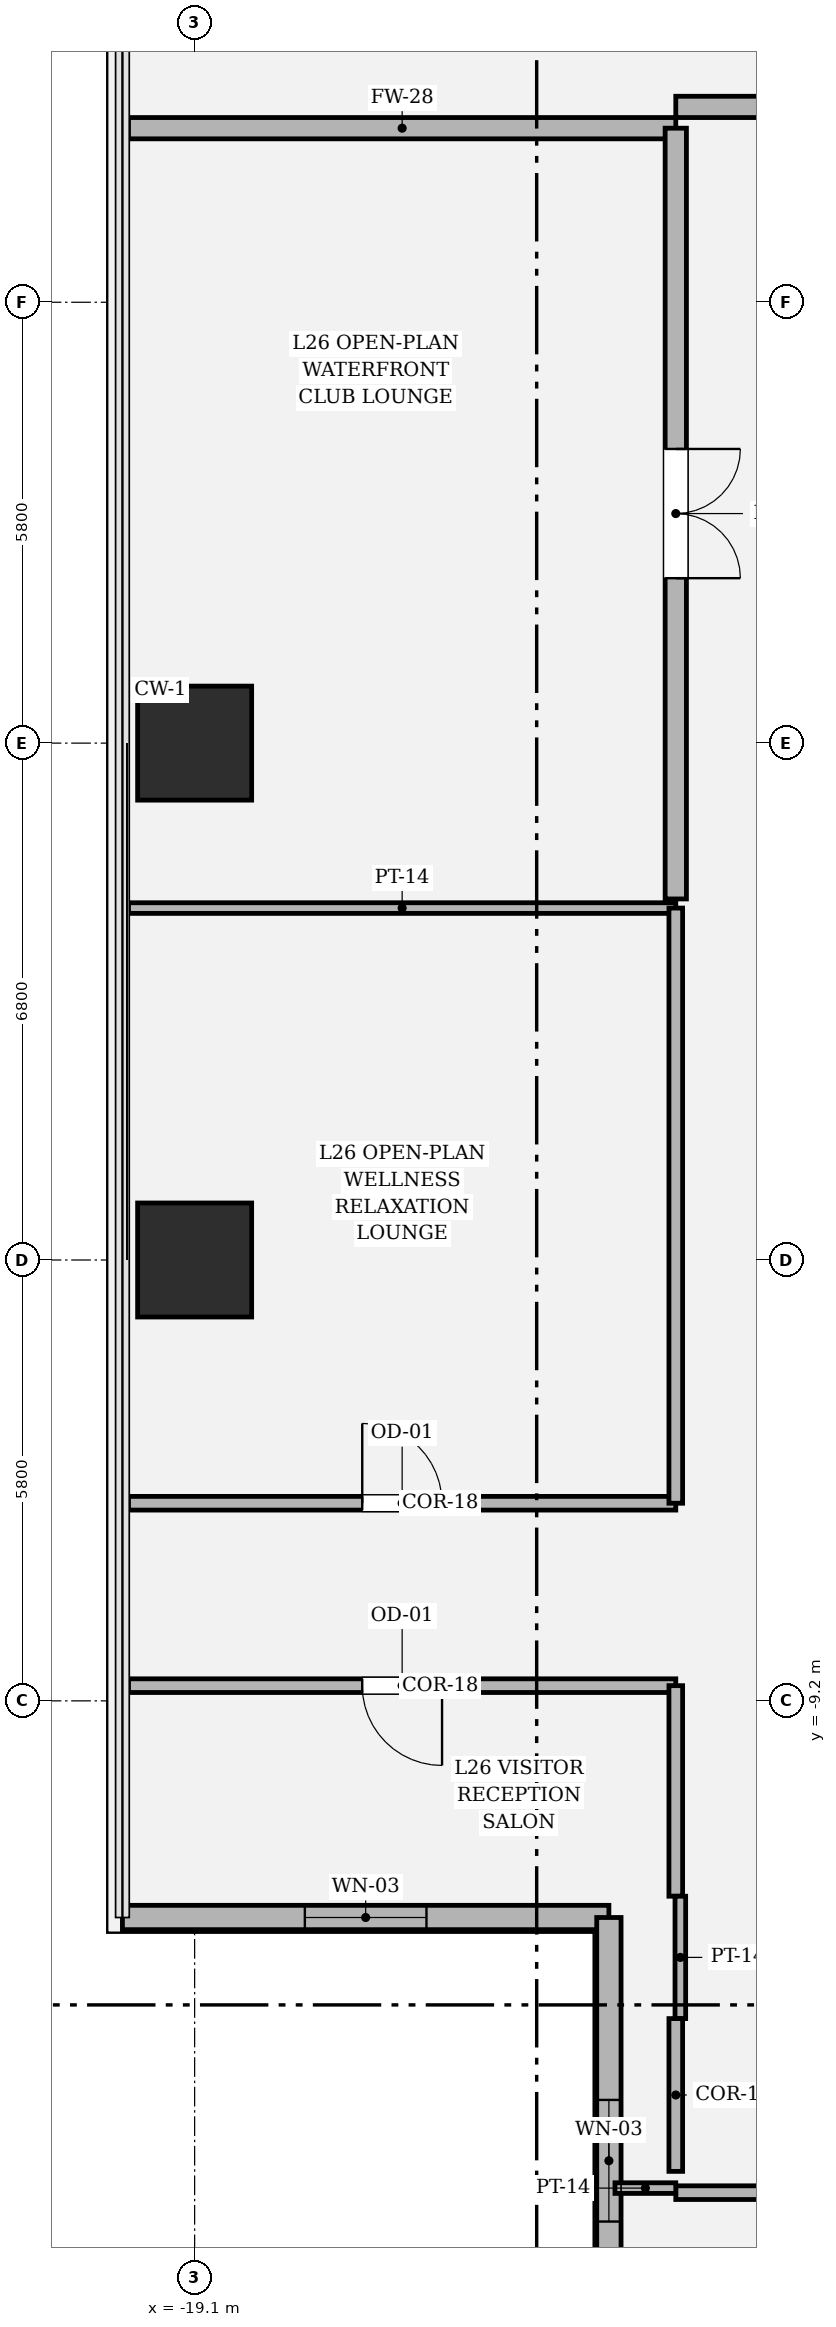
"""IFC4 building model, lengths in metres.
Left out: names, types, materials, properties, quantities, classifications, styles, units other than length and angle.
Written with IfcOpenShell. Run it as: python <this file> out.ifc"""

import sys

from ifc_helpers import new_model, si_unit, direction, frame, frame_2d, origin, origin_2d, place, context, subcontext, project, spatial, rectangle, hollow_rectangle, extrude, element, fill, save


model = new_model("IFC4")
c1 = context("Model", 3, precision=1e-05, world=origin(), true_north=direction((0.0, 1.0)))
c2 = subcontext(c1, "Body", "Model", "MODEL_VIEW")
j1 = project(units=[si_unit("LENGTHUNIT", "METRE"), si_unit("PLANEANGLEUNIT", "RADIAN")], contexts=[c1])
p1 = place(None, origin())
s1 = spatial("IfcSite", under=j1, at=p1, CompositionType="ELEMENT")
p2 = place(p1, origin())
s2 = spatial("IfcBuilding", under=s1, at=p2, CompositionType="ELEMENT")
p3 = place(p2, frame((0.0, 0.0, 113.25)))
s3 = spatial("IfcBuildingStorey", under=s2, at=p3, CompositionType="ELEMENT", Elevation=113.25)
for number, where, z_axis, x_axis in (
    (1, (-19.1, 3.4, 0.0), (0.0, 0.0, 1.0), (1.0, 0.0, 0.0)),
    (2, (-19.1, -3.4, 0.0), (0.0, 0.0, 1.0), (1.0, 0.0, 0.0)),
):
    element("IfcColumn", number, at=place(p3, frame(where, z_axis=z_axis, x_axis=x_axis)), inside=s3, PredefinedType="COLUMN", context=c2, shape_type="SweptSolid", body=[
        extrude(hollow_rectangle(XDim=1.5, YDim=1.5, WallThickness=0.045, at=origin_2d()), origin(), (0.0, 0.0, 1.0), 4.05),
    ])
p4 = place(p3, frame((-20.05, -12.05, 0.0), z_axis=(0.0, 0.0, 1.0), x_axis=(1.0, 0.0, 0.0)))
e3 = element("IfcWall", 3, at=p4, inside=s3, PredefinedType="SOLIDWALL", context=c2, shape_type="SweptSolid", body=[
    extrude(rectangle(XDim=6.4, YDim=0.32, at=frame_2d((3.2, 0.0))), origin(), (0.0, 0.0, 1.0), 3.104),
])
p5 = place(p4, frame((2.4, 0.0, 0.464)))
e4 = element("IfcOpeningElement", 4, at=p5, cuts=e3, PredefinedType="OPENING", context=c2, shape_type="SweptSolid", body=[
    extrude(rectangle(XDim=1.6, YDim=2.4, at=frame_2d((0.8, 1.2))), frame((0.0, 0.17, 0.0), z_axis=(0.0, -1.0, 0.0), x_axis=(1.0, 0.0, 0.0)), (0.0, 0.0, 1.0), 0.34),
])
p6 = place(p3, frame((-13.65, -12.05, 0.0), z_axis=(0.0, 0.0, 1.0), x_axis=(0.0, -1.0, 0.0)))
e5 = element("IfcWall", 5, at=p6, inside=s3, PredefinedType="SOLIDWALL", context=c2, shape_type="SweptSolid", body=[
    extrude(rectangle(XDim=6.4, YDim=0.32, at=frame_2d((3.2, 0.0))), origin(), (0.0, 0.0, 1.0), 3.104),
])
p7 = place(p6, frame((2.4, 0.0, 0.464)))
e6 = element("IfcOpeningElement", 6, at=p7, cuts=e5, PredefinedType="OPENING", context=c2, shape_type="SweptSolid", body=[
    extrude(rectangle(XDim=1.6, YDim=2.4, at=frame_2d((0.8, 1.2))), frame((0.0, 0.17, 0.0), z_axis=(0.0, -1.0, 0.0), x_axis=(1.0, 0.0, 0.0)), (0.0, 0.0, 1.0), 0.34),
])
p8 = place(p3, frame((-12.77, -15.67, 0.0), z_axis=(0.0, 0.0, 1.0), x_axis=(1.0, 0.0, 0.0)))
e7 = element("IfcWall", 7, at=p8, inside=s3, PredefinedType="PARTITIONING", context=c2, shape_type="SweptSolid", body=[
    extrude(rectangle(XDim=15.11, YDim=0.18, at=frame_2d((7.555, 0.0))), origin(), (0.0, 0.0, 1.0), 3.104),
])
p9 = place(p8, frame((7.03, 0.0, 0.0)))
e8 = element("IfcOpeningElement", 8, at=p9, cuts=e7, PredefinedType="OPENING", context=c2, shape_type="SweptSolid", body=[
    extrude(rectangle(XDim=1.05, YDim=2.2, at=frame_2d((0.525, 1.1))), frame((0.0, 0.1, 0.0), z_axis=(0.0, -1.0, 0.0), x_axis=(1.0, 0.0, 0.0)), (0.0, 0.0, 1.0), 0.2),
])
p10 = place(p3, frame((-13.57, -15.61, 0.0), z_axis=(0.0, 0.0, 1.0), x_axis=(1.0, 0.0, 0.0)))
e9 = element("IfcWall", 9, at=p10, inside=s3, PredefinedType="PARTITIONING", context=c2, shape_type="SweptSolid", body=[
    extrude(rectangle(XDim=0.8, YDim=0.14, at=frame_2d((0.4, 0.0))), origin(), (0.0, 0.0, 1.0), 3.81),
])
p11 = place(p3, frame((-19.97, -9.0, 0.0), z_axis=(0.0, 0.0, 1.0), x_axis=(1.0, 0.0, 0.0)))
e10 = element("IfcWall", 10, at=p11, inside=s3, PredefinedType="PARTITIONING", context=c2, shape_type="SweptSolid", body=[
    extrude(rectangle(XDim=7.2, YDim=0.18, at=frame_2d((3.6, 0.0))), origin(), (0.0, 0.0, 1.0), 3.104),
])
p12 = place(p11, frame((3.075, 0.0, 0.0)))
e11 = element("IfcOpeningElement", 11, at=p12, cuts=e10, PredefinedType="OPENING", context=c2, shape_type="SweptSolid", body=[
    extrude(rectangle(XDim=1.05, YDim=2.2, at=frame_2d((0.525, 1.1))), frame((0.0, 0.1, 0.0), z_axis=(0.0, -1.0, 0.0), x_axis=(1.0, 0.0, 0.0)), (0.0, 0.0, 1.0), 0.2),
])
p13 = place(p3, frame((-12.77, -9.0, 0.0), z_axis=(0.0, 0.0, 1.0), x_axis=(0.0, -1.0, 0.0)))
e12 = element("IfcWall", 12, at=p13, inside=s3, PredefinedType="PARTITIONING", context=c2, shape_type="SweptSolid", body=[
    extrude(rectangle(XDim=2.77, YDim=0.18, at=frame_2d((1.385, 0.0))), origin(), (0.0, 0.0, 1.0), 3.104),
])
p14 = place(p3, frame((-12.71, -11.77, 0.0), z_axis=(0.0, 0.0, 1.0), x_axis=(0.0, -1.0, 0.0)))
e13 = element("IfcWall", 13, at=p14, inside=s3, PredefinedType="PARTITIONING", context=c2, shape_type="SweptSolid", body=[
    extrude(rectangle(XDim=1.61, YDim=0.14, at=frame_2d((0.805, 0.0))), origin(), (0.0, 0.0, 1.0), 3.354),
])
p15 = place(p3, frame((-12.77, -13.38, 0.0), z_axis=(0.0, 0.0, 1.0), x_axis=(0.0, -1.0, 0.0)))
e14 = element("IfcWall", 14, at=p15, inside=s3, PredefinedType="PARTITIONING", context=c2, shape_type="SweptSolid", body=[
    extrude(rectangle(XDim=2.01, YDim=0.18, at=frame_2d((1.005, 0.0))), origin(), (0.0, 0.0, 1.0), 3.354),
])
p16 = place(p3, frame((-12.77, -6.6, 0.0), z_axis=(0.0, 0.0, 1.0), x_axis=(-1.0, 0.0, 0.0)))
e15 = element("IfcWall", 15, at=p16, inside=s3, PredefinedType="PARTITIONING", context=c2, shape_type="SweptSolid", body=[
    extrude(rectangle(XDim=7.2, YDim=0.18, at=frame_2d((3.6, 0.0))), origin(), (0.0, 0.0, 1.0), 3.104),
])
p17 = place(p16, frame((3.075, 0.0, 0.0)))
e16 = element("IfcOpeningElement", 16, at=p17, cuts=e15, PredefinedType="OPENING", context=c2, shape_type="SweptSolid", body=[
    extrude(rectangle(XDim=1.05, YDim=2.2, at=frame_2d((0.525, 1.1))), frame((0.0, 0.1, 0.0), z_axis=(0.0, -1.0, 0.0), x_axis=(1.0, 0.0, 0.0)), (0.0, 0.0, 1.0), 0.2),
])
p18 = place(p3, frame((-19.97, 1.23, 0.0), z_axis=(0.0, 0.0, 1.0), x_axis=(1.0, 0.0, 0.0)))
e17 = element("IfcWall", 17, at=p18, inside=s3, PredefinedType="PARTITIONING", context=c2, shape_type="SweptSolid", body=[
    extrude(rectangle(XDim=7.2, YDim=0.14, at=frame_2d((3.6, 0.0))), origin(), (0.0, 0.0, 1.0), 3.104),
])
p19 = place(p3, frame((-12.77, 1.23, 0.0), z_axis=(0.0, 0.0, 1.0), x_axis=(0.0, -1.0, 0.0)))
e18 = element("IfcWall", 18, at=p19, inside=s3, PredefinedType="PARTITIONING", context=c2, shape_type="SweptSolid", body=[
    extrude(rectangle(XDim=7.83, YDim=0.18, at=frame_2d((3.915, 0.0))), origin(), (0.0, 0.0, 1.0), 3.104),
])
p20 = place(p3, frame((-19.97, 11.49, 0.0), z_axis=(0.0, 0.0, 1.0), x_axis=(1.0, 0.0, 0.0)))
e19 = element("IfcWall", 19, at=p20, inside=s3, PredefinedType="SOLIDWALL", context=c2, shape_type="SweptSolid", body=[
    extrude(rectangle(XDim=7.2, YDim=0.28, at=frame_2d((3.6, 0.0))), origin(), (0.0, 0.0, 1.0), 3.104),
])
p21 = place(p3, frame((-12.77, 11.49, 0.0), z_axis=(0.0, 0.0, 1.0), x_axis=(0.0, -1.0, 0.0)))
e20 = element("IfcWall", 20, at=p21, inside=s3, PredefinedType="SOLIDWALL", context=c2, shape_type="SweptSolid", body=[
    extrude(rectangle(XDim=10.14, YDim=0.28, at=frame_2d((5.07, 0.0))), origin(), (0.0, 0.0, 1.0), 3.104),
])
p22 = place(p21, frame((4.22, 0.0, 0.0)))
e21 = element("IfcOpeningElement", 21, at=p22, cuts=e20, PredefinedType="OPENING", context=c2, shape_type="SweptSolid", body=[
    extrude(rectangle(XDim=1.7, YDim=2.3, at=frame_2d((0.85, 1.15))), frame((0.0, 0.15, 0.0), z_axis=(0.0, -1.0, 0.0), x_axis=(1.0, 0.0, 0.0)), (0.0, 0.0, 1.0), 0.3),
])
p23 = place(p3, frame((2.34, 11.77, 0.0), z_axis=(0.0, 0.0, 1.0), x_axis=(-1.0, 0.0, 0.0)))
e22 = element("IfcWall", 22, at=p23, inside=s3, PredefinedType="SOLIDWALL", context=c2, shape_type="SweptSolid", body=[
    extrude(rectangle(XDim=15.11, YDim=0.28, at=frame_2d((7.555, 0.0))), origin(), (0.0, 0.0, 1.0), 3.104),
])
p24 = place(p23, frame((6.705, 0.0, 0.0)))
e23 = element("IfcOpeningElement", 23, at=p24, cuts=e22, PredefinedType="OPENING", context=c2, shape_type="SweptSolid", body=[
    extrude(rectangle(XDim=1.7, YDim=2.3, at=frame_2d((0.85, 1.15))), frame((0.0, 0.15, 0.0), z_axis=(0.0, -1.0, 0.0), x_axis=(1.0, 0.0, 0.0)), (0.0, 0.0, 1.0), 0.3),
])
p25 = place(p5, origin())
e24 = element("IfcWindow", 24, at=p25, inside=s3, PartitioningType="SINGLE_PANEL", PredefinedType="WINDOW", context=c2, shape_type="SweptSolid", body=[
    extrude(rectangle(XDim=1.6, YDim=2.4, at=frame_2d((0.8, 1.2))), frame((0.0, 0.03, 0.0), z_axis=(0.0, -1.0, 0.0), x_axis=(1.0, 0.0, 0.0)), (0.0, 0.0, 1.0), 0.06),
])
fill(e4, e24)
p26 = place(p7, origin())
e25 = element("IfcWindow", 25, at=p26, inside=s3, PartitioningType="SINGLE_PANEL", PredefinedType="WINDOW", context=c2, shape_type="SweptSolid", body=[
    extrude(rectangle(XDim=1.6, YDim=2.4, at=frame_2d((0.8, 1.2))), frame((0.0, 0.03, 0.0), z_axis=(0.0, -1.0, 0.0), x_axis=(1.0, 0.0, 0.0)), (0.0, 0.0, 1.0), 0.06),
])
fill(e6, e25)
p27 = place(p12, origin())
e26 = element("IfcDoor", 26, at=p27, inside=s3, OperationType="SINGLE_SWING_RIGHT", PredefinedType="DOOR", context=c2, shape_type="SweptSolid", body=[
    extrude(rectangle(XDim=1.05, YDim=2.2, at=frame_2d((0.525, 1.1))), frame((0.0, 0.025, 0.0), z_axis=(0.0, -1.0, 0.0), x_axis=(1.0, 0.0, 0.0)), (0.0, 0.0, 1.0), 0.05),
])
fill(e11, e26)
p28 = place(p17, origin())
e27 = element("IfcDoor", 27, at=p28, inside=s3, OperationType="SINGLE_SWING_RIGHT", PredefinedType="DOOR", context=c2, shape_type="SweptSolid", body=[
    extrude(rectangle(XDim=1.05, YDim=2.2, at=frame_2d((0.525, 1.1))), frame((0.0, 0.025, 0.0), z_axis=(0.0, -1.0, 0.0), x_axis=(1.0, 0.0, 0.0)), (0.0, 0.0, 1.0), 0.05),
])
fill(e16, e27)
p29 = place(p22, origin())
e28 = element("IfcDoor", 28, at=p29, inside=s3, OperationType="DOUBLE_DOOR_SINGLE_SWING", PredefinedType="DOOR", context=c2, shape_type="SweptSolid", body=[
    extrude(rectangle(XDim=1.7, YDim=2.3, at=frame_2d((0.85, 1.15))), frame((0.0, 0.025, 0.0), z_axis=(0.0, -1.0, 0.0), x_axis=(1.0, 0.0, 0.0)), (0.0, 0.0, 1.0), 0.05),
])
fill(e21, e28)
save(model, sys.argv[1])
